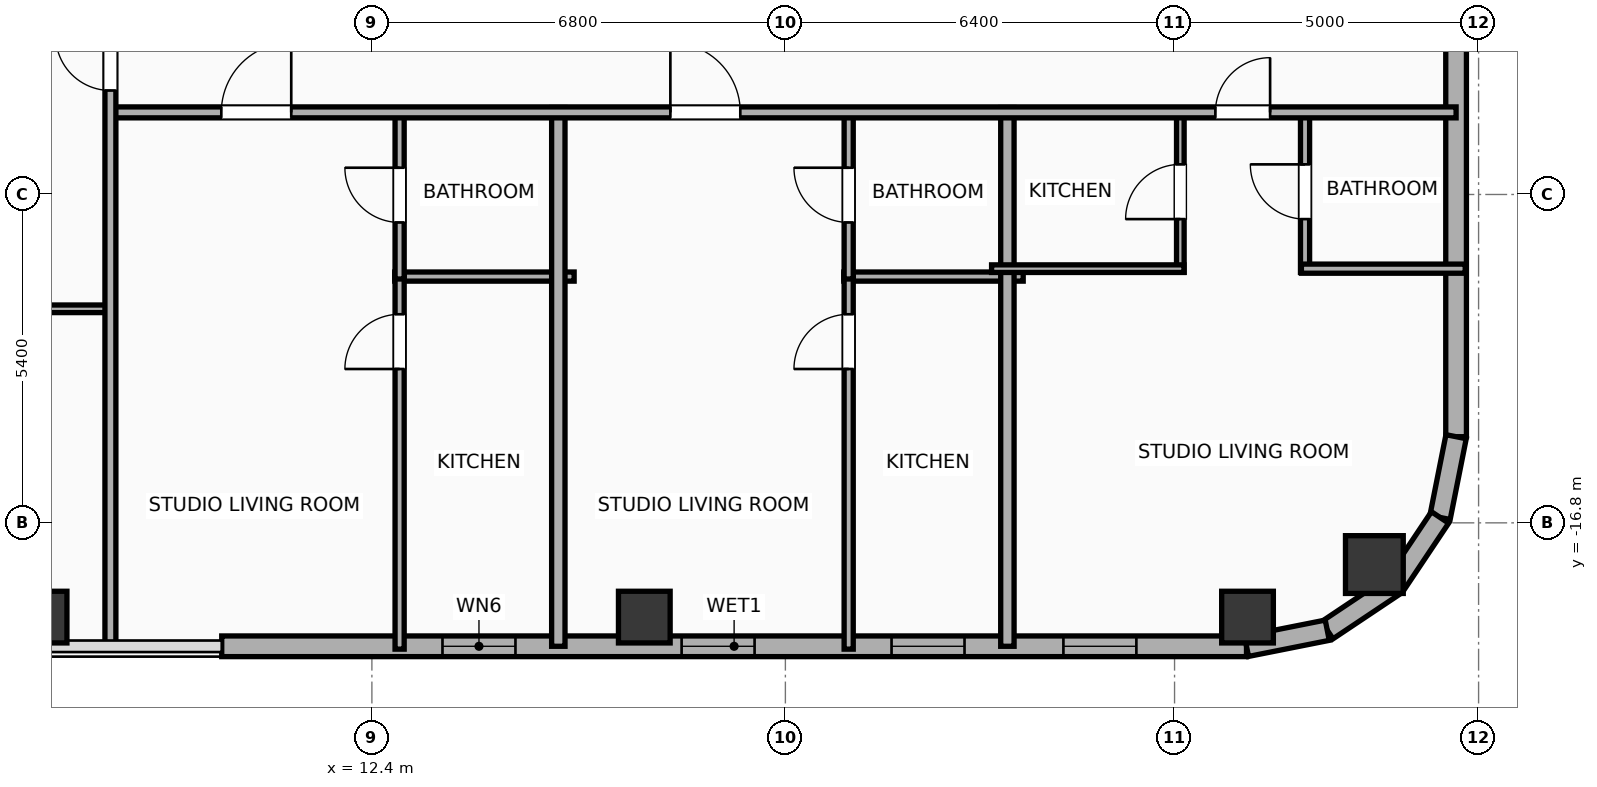
"""IFC4 building model, lengths in metres.
Left out: names, types, materials, properties, quantities, classifications, styles, units other than length and angle.
Written with IfcOpenShell. Run it as: python <this file> out.ifc"""

import sys

from ifc_helpers import new_model, si_unit, direction, frame, frame_2d, origin, origin_2d, place, context, subcontext, project, spatial, rectangle, hollow_rectangle, hollow_circle, extrude, element, fill, save


model = new_model("IFC4")
c1 = context("Model", 3, precision=1e-05, world=origin(), true_north=direction((0.0, 1.0)))
c2 = subcontext(c1, "Body", "Model", "MODEL_VIEW")
j1 = project(units=[si_unit("LENGTHUNIT", "METRE"), si_unit("PLANEANGLEUNIT", "RADIAN")], contexts=[c1])
p1 = place(None, origin())
s1 = spatial("IfcSite", under=j1, at=p1, CompositionType="ELEMENT")
p2 = place(p1, origin())
s2 = spatial("IfcBuilding", under=s1, at=p2, CompositionType="ELEMENT")
p3 = place(p2, frame((0.0, 0.0, 211.9)))
s3 = spatial("IfcBuildingStorey", under=s2, at=p3, CompositionType="ELEMENT", Elevation=211.9)
for number, where, z_axis, x_axis in (
    (1, (6.96, -18.35, 0.0), (0.0, 0.0, 1.0), (1.0, 0.0, 0.0)),
    (2, (16.88, -18.35, 0.0), (0.0, 0.0, 1.0), (1.0, 0.0, 0.0)),
    (3, (26.8, -18.35, 0.0), (0.0, 0.0, 1.0), (1.0, 0.0, 0.0)),
):
    element("IfcColumn", number, at=place(p3, frame(where, z_axis=z_axis, x_axis=x_axis)), inside=s3, PredefinedType="COLUMN", context=c2, shape_type="SweptSolid", body=[
        extrude(hollow_rectangle(XDim=0.85, YDim=0.85, WallThickness=0.028, at=origin_2d()), origin(), (0.0, 0.0, 1.0), 3.9),
    ])
p4 = place(p3, frame((28.886, -17.486, 0.0), z_axis=(0.0, 0.0, 1.0), x_axis=(1.0, 0.0, 0.0)))
e4 = element("IfcColumn", 4, at=p4, inside=s3, PredefinedType="COLUMN", context=c2, shape_type="SweptSolid", body=[
    extrude(hollow_circle(Radius=0.475, WallThickness=0.032, at=origin_2d()), origin(), (0.0, 0.0, 1.0), 3.9),
])
p5 = place(p3, frame((26.783, -18.83, 0.0), z_axis=(0.0, 0.0, 1.0), x_axis=(-1.0, 0.0, 0.0)))
e5 = element("IfcWall", 5, at=p5, inside=s3, PredefinedType="ELEMENTEDWALL", context=c2, shape_type="SweptSolid", body=[
    extrude(rectangle(XDim=16.853, YDim=0.34, at=frame_2d((8.426, 0.0))), origin(), (0.0, 0.0, 1.0), 3.65),
])
p6 = place(p5, frame((12.022, 0.0, 0.75)))
e6 = element("IfcOpeningElement", 6, at=p6, cuts=e5, PredefinedType="OPENING", context=c2, shape_type="SweptSolid", body=[
    extrude(rectangle(XDim=1.2, YDim=2.05, at=frame_2d((0.6, 1.025))), frame((0.0, 0.18, 0.0), z_axis=(0.0, -1.0, 0.0), x_axis=(1.0, 0.0, 0.0)), (0.0, 0.0, 1.0), 0.36),
])
p7 = place(p5, frame((8.09, 0.0, 0.75)))
e7 = element("IfcOpeningElement", 7, at=p7, cuts=e5, PredefinedType="OPENING", context=c2, shape_type="SweptSolid", body=[
    extrude(rectangle(XDim=1.2, YDim=2.05, at=frame_2d((0.6, 1.025))), frame((0.0, 0.18, 0.0), z_axis=(0.0, -1.0, 0.0), x_axis=(1.0, 0.0, 0.0)), (0.0, 0.0, 1.0), 0.36),
])
p8 = place(p5, frame((4.637, 0.0, 0.75)))
e8 = element("IfcOpeningElement", 8, at=p8, cuts=e5, PredefinedType="OPENING", context=c2, shape_type="SweptSolid", body=[
    extrude(rectangle(XDim=1.2, YDim=2.05, at=frame_2d((0.6, 1.025))), frame((0.0, 0.18, 0.0), z_axis=(0.0, -1.0, 0.0), x_axis=(1.0, 0.0, 0.0)), (0.0, 0.0, 1.0), 0.36),
])
p9 = place(p5, frame((1.811, 0.0, 0.75)))
e9 = element("IfcOpeningElement", 9, at=p9, cuts=e5, PredefinedType="OPENING", context=c2, shape_type="SweptSolid", body=[
    extrude(rectangle(XDim=1.2, YDim=2.05, at=frame_2d((0.6, 1.025))), frame((0.0, 0.18, 0.0), z_axis=(0.0, -1.0, 0.0), x_axis=(1.0, 0.0, 0.0)), (0.0, 0.0, 1.0), 0.36),
])
p10 = place(p3, frame((30.23, -4.515, 0.0), z_axis=(0.0, 0.0, 1.0), x_axis=(0.0, -1.0, 0.0)))
e10 = element("IfcWall", 10, at=p10, inside=s3, PredefinedType="ELEMENTEDWALL", context=c2, shape_type="SweptSolid", body=[
    extrude(rectangle(XDim=10.869, YDim=0.34, at=frame_2d((5.434, 0.0))), origin(), (0.0, 0.0, 1.0), 3.65),
])
p11 = place(p3, frame((30.23, -15.383, 0.0), z_axis=(0.0, 0.0, 1.0), x_axis=(-0.195110379894, -0.98078129043, 0.0)))
e11 = element("IfcWall", 11, at=p11, inside=s3, PredefinedType="ELEMENTEDWALL", context=c2, shape_type="SweptSolid", body=[
    extrude(rectangle(XDim=1.354, YDim=0.34, at=frame_2d((0.677, 0.0))), origin(), (0.0, 0.0, 1.0), 3.65),
])
p12 = place(p3, frame((29.966, -16.711, 0.0), z_axis=(0.0, 0.0, 1.0), x_axis=(-0.555584683399, -0.831459956686, 0.0)))
e12 = element("IfcWall", 12, at=p12, inside=s3, PredefinedType="ELEMENTEDWALL", context=c2, shape_type="SweptSolid", body=[
    extrude(rectangle(XDim=1.337, YDim=0.34, at=frame_2d((0.668, 0.0))), origin(), (0.0, 0.0, 1.0), 3.65),
])
p13 = place(p3, frame((29.223, -17.823, 0.0), z_axis=(0.0, 0.0, 1.0), x_axis=(-0.831403586725, -0.555669034571, 0.0)))
e13 = element("IfcWall", 13, at=p13, inside=s3, PredefinedType="ELEMENTEDWALL", context=c2, shape_type="SweptSolid", body=[
    extrude(rectangle(XDim=1.337, YDim=0.34, at=frame_2d((0.668, 0.0))), origin(), (0.0, 0.0, 1.0), 3.65),
])
p14 = place(p3, frame((28.111, -18.566, 0.0), z_axis=(0.0, 0.0, 1.0), x_axis=(-0.980788153188, -0.195075878998, 0.0)))
e14 = element("IfcWall", 14, at=p14, inside=s3, PredefinedType="ELEMENTEDWALL", context=c2, shape_type="SweptSolid", body=[
    extrude(rectangle(XDim=1.354, YDim=0.34, at=frame_2d((0.677, 0.0))), origin(), (0.0, 0.0, 1.0), 3.65),
])
p15 = place(p3, frame((12.776, -12.75, 0.0), z_axis=(0.0, 0.0, 1.0), x_axis=(1.0, 0.0, 0.0)))
e15 = element("IfcWall", 15, at=p15, inside=s3, PredefinedType="PLUMBINGWALL", context=c2, shape_type="SweptSolid", body=[
    extrude(rectangle(XDim=2.95, YDim=0.15, at=frame_2d((1.475, 0.0))), origin(), (0.0, 0.0, 1.0), 3.65),
])
p16 = place(p3, frame((12.856, -18.877, 0.0), z_axis=(0.0, 0.0, 1.0), x_axis=(0.0, 1.0, 0.0)))
e16 = element("IfcWall", 16, at=p16, inside=s3, PredefinedType="PLUMBINGWALL", context=c2, shape_type="SweptSolid", body=[
    extrude(rectangle(XDim=6.167, YDim=0.15, at=frame_2d((3.083, 0.0))), origin(), (0.0, 0.0, 1.0), 3.65),
])
p17 = place(p16, frame((4.607, 0.0, 0.0)))
e17 = element("IfcOpeningElement", 17, at=p17, cuts=e16, PredefinedType="OPENING", context=c2, shape_type="SweptSolid", body=[
    extrude(rectangle(XDim=0.9, YDim=2.05, at=frame_2d((0.45, 1.025))), frame((0.0, 0.085, 0.0), z_axis=(0.0, -1.0, 0.0), x_axis=(1.0, 0.0, 0.0)), (0.0, 0.0, 1.0), 0.17),
])
p18 = place(p3, frame((12.856, -12.79, 0.0), z_axis=(0.0, 0.0, 1.0), x_axis=(0.0, 1.0, 0.0)))
e18 = element("IfcWall", 18, at=p18, inside=s3, PredefinedType="PLUMBINGWALL", context=c2, shape_type="SweptSolid", body=[
    extrude(rectangle(XDim=2.76, YDim=0.15, at=frame_2d((1.38, 0.0))), origin(), (0.0, 0.0, 1.0), 3.65),
])
p19 = place(p18, frame((0.93, 0.0, 0.0)))
e19 = element("IfcOpeningElement", 19, at=p19, cuts=e18, PredefinedType="OPENING", context=c2, shape_type="SweptSolid", body=[
    extrude(rectangle(XDim=0.9, YDim=2.05, at=frame_2d((0.45, 1.025))), frame((0.0, 0.085, 0.0), z_axis=(0.0, -1.0, 0.0), x_axis=(1.0, 0.0, 0.0)), (0.0, 0.0, 1.0), 0.17),
])
p20 = place(p3, frame((15.466, -18.83, 0.0), z_axis=(0.0, 0.0, 1.0), x_axis=(0.0, 1.0, 0.0)))
e20 = element("IfcWall", 20, at=p20, inside=s3, PredefinedType="PARTITIONING", context=c2, shape_type="SweptSolid", body=[
    extrude(rectangle(XDim=8.86, YDim=0.22, at=frame_2d((4.43, 0.0))), origin(), (0.0, 0.0, 1.0), 3.65),
])
p21 = place(p3, frame((20.161, -12.75, 0.0), z_axis=(0.0, 0.0, 1.0), x_axis=(1.0, 0.0, 0.0)))
e21 = element("IfcWall", 21, at=p21, inside=s3, PredefinedType="PLUMBINGWALL", context=c2, shape_type="SweptSolid", body=[
    extrude(rectangle(XDim=2.95, YDim=0.15, at=frame_2d((1.475, 0.0))), origin(), (0.0, 0.0, 1.0), 3.65),
])
p22 = place(p3, frame((20.241, -18.877, 0.0), z_axis=(0.0, 0.0, 1.0), x_axis=(0.0, 1.0, 0.0)))
e22 = element("IfcWall", 22, at=p22, inside=s3, PredefinedType="PLUMBINGWALL", context=c2, shape_type="SweptSolid", body=[
    extrude(rectangle(XDim=6.167, YDim=0.15, at=frame_2d((3.083, 0.0))), origin(), (0.0, 0.0, 1.0), 3.65),
])
p23 = place(p22, frame((4.607, 0.0, 0.0)))
e23 = element("IfcOpeningElement", 23, at=p23, cuts=e22, PredefinedType="OPENING", context=c2, shape_type="SweptSolid", body=[
    extrude(rectangle(XDim=0.9, YDim=2.05, at=frame_2d((0.45, 1.025))), frame((0.0, 0.085, 0.0), z_axis=(0.0, -1.0, 0.0), x_axis=(1.0, 0.0, 0.0)), (0.0, 0.0, 1.0), 0.17),
])
p24 = place(p3, frame((20.241, -12.79, 0.0), z_axis=(0.0, 0.0, 1.0), x_axis=(0.0, 1.0, 0.0)))
e24 = element("IfcWall", 24, at=p24, inside=s3, PredefinedType="PLUMBINGWALL", context=c2, shape_type="SweptSolid", body=[
    extrude(rectangle(XDim=2.76, YDim=0.15, at=frame_2d((1.38, 0.0))), origin(), (0.0, 0.0, 1.0), 3.65),
])
p25 = place(p24, frame((0.93, 0.0, 0.0)))
e25 = element("IfcOpeningElement", 25, at=p25, cuts=e24, PredefinedType="OPENING", context=c2, shape_type="SweptSolid", body=[
    extrude(rectangle(XDim=0.9, YDim=2.05, at=frame_2d((0.45, 1.025))), frame((0.0, 0.085, 0.0), z_axis=(0.0, -1.0, 0.0), x_axis=(1.0, 0.0, 0.0)), (0.0, 0.0, 1.0), 0.17),
])
p26 = place(p3, frame((22.851, -18.83, 0.0), z_axis=(0.0, 0.0, 1.0), x_axis=(0.0, 1.0, 0.0)))
e26 = element("IfcWall", 26, at=p26, inside=s3, PredefinedType="PARTITIONING", context=c2, shape_type="SweptSolid", body=[
    extrude(rectangle(XDim=8.86, YDim=0.22, at=frame_2d((4.43, 0.0))), origin(), (0.0, 0.0, 1.0), 3.65),
])
p27 = place(p3, frame((25.695, -12.68, 0.0), z_axis=(0.0, 0.0, 1.0), x_axis=(0.0, 1.0, 0.0)))
e27 = element("IfcWall", 27, at=p27, inside=s3, PredefinedType="PARTITIONING", context=c2, shape_type="SweptSolid", body=[
    extrude(rectangle(XDim=2.65, YDim=0.125, at=frame_2d((1.325, 0.0))), origin(), (0.0, 0.0, 1.0), 3.65),
])
p28 = place(p27, frame((0.875, 0.0, 0.0)))
e28 = element("IfcOpeningElement", 28, at=p28, cuts=e27, PredefinedType="OPENING", context=c2, shape_type="SweptSolid", body=[
    extrude(rectangle(XDim=0.9, YDim=2.05, at=frame_2d((0.45, 1.025))), frame((0.0, 0.073, 0.0), z_axis=(0.0, -1.0, 0.0), x_axis=(1.0, 0.0, 0.0)), (0.0, 0.0, 1.0), 0.145),
])
p29 = place(p3, frame((27.746, -12.68, 0.0), z_axis=(0.0, 0.0, 1.0), x_axis=(0.0, 1.0, 0.0)))
e29 = element("IfcWall", 29, at=p29, inside=s3, PredefinedType="PLUMBINGWALL", context=c2, shape_type="SweptSolid", body=[
    extrude(rectangle(XDim=2.65, YDim=0.15, at=frame_2d((1.325, 0.0))), origin(), (0.0, 0.0, 1.0), 3.65),
])
p30 = place(p29, frame((0.875, 0.0, 0.0)))
e30 = element("IfcOpeningElement", 30, at=p30, cuts=e29, PredefinedType="OPENING", context=c2, shape_type="SweptSolid", body=[
    extrude(rectangle(XDim=0.9, YDim=2.05, at=frame_2d((0.45, 1.025))), frame((0.0, 0.085, 0.0), z_axis=(0.0, -1.0, 0.0), x_axis=(1.0, 0.0, 0.0)), (0.0, 0.0, 1.0), 0.17),
])
p31 = place(p3, frame((22.591, -12.62, 0.0), z_axis=(0.0, 0.0, 1.0), x_axis=(1.0, 0.0, 0.0)))
e31 = element("IfcWall", 31, at=p31, inside=s3, PredefinedType="PARTITIONING", context=c2, shape_type="SweptSolid", body=[
    extrude(rectangle(XDim=3.164, YDim=0.125, at=frame_2d((1.582, 0.0))), origin(), (0.0, 0.0, 1.0), 3.65),
])
p32 = place(p3, frame((27.686, -12.62, 0.0), z_axis=(0.0, 0.0, 1.0), x_axis=(1.0, 0.0, 0.0)))
e32 = element("IfcWall", 32, at=p32, inside=s3, PredefinedType="PLUMBINGWALL", context=c2, shape_type="SweptSolid", body=[
    extrude(rectangle(XDim=2.694, YDim=0.15, at=frame_2d((1.347, 0.0))), origin(), (0.0, 0.0, 1.0), 3.65),
])
p33 = place(p3, frame((8.08, -10.05, 0.0), z_axis=(0.0, 0.0, 1.0), x_axis=(1.0, 0.0, 0.0)))
e33 = element("IfcWall", 33, at=p33, inside=s3, PredefinedType="PARTITIONING", context=c2, shape_type="SweptSolid", body=[
    extrude(rectangle(XDim=22.15, YDim=0.18, at=frame_2d((11.075, 0.0))), origin(), (0.0, 0.0, 1.0), 3.65),
])
p34 = place(p33, frame((1.844, 0.0, 0.0)))
e34 = element("IfcOpeningElement", 34, at=p34, cuts=e33, PredefinedType="OPENING", context=c2, shape_type="SweptSolid", body=[
    extrude(rectangle(XDim=1.15, YDim=2.05, at=frame_2d((0.575, 1.025))), frame((0.0, 0.1, 0.0), z_axis=(0.0, -1.0, 0.0), x_axis=(1.0, 0.0, 0.0)), (0.0, 0.0, 1.0), 0.2),
])
p35 = place(p33, frame((9.229, 0.0, 0.0)))
e35 = element("IfcOpeningElement", 35, at=p35, cuts=e33, PredefinedType="OPENING", context=c2, shape_type="SweptSolid", body=[
    extrude(rectangle(XDim=1.15, YDim=2.05, at=frame_2d((0.575, 1.025))), frame((0.0, 0.1, 0.0), z_axis=(0.0, -1.0, 0.0), x_axis=(1.0, 0.0, 0.0)), (0.0, 0.0, 1.0), 0.2),
])
p36 = place(p33, frame((18.191, 0.0, 0.0)))
e36 = element("IfcOpeningElement", 36, at=p36, cuts=e33, PredefinedType="OPENING", context=c2, shape_type="SweptSolid", body=[
    extrude(rectangle(XDim=0.9, YDim=2.05, at=frame_2d((0.45, 1.025))), frame((0.0, 0.1, 0.0), z_axis=(0.0, -1.0, 0.0), x_axis=(1.0, 0.0, 0.0)), (0.0, 0.0, 1.0), 0.2),
])
p37 = place(p3, frame((0.02, -13.28, 0.0), z_axis=(0.0, 0.0, 1.0), x_axis=(1.0, 0.0, 0.0)))
e37 = element("IfcWall", 37, at=p37, inside=s3, PredefinedType="PARTITIONING", context=c2, shape_type="SweptSolid", body=[
    extrude(rectangle(XDim=8.06, YDim=0.125, at=frame_2d((4.03, 0.0))), origin(), (0.0, 0.0, 1.0), 3.65),
])
p38 = place(p37, frame((1.323, 0.0, 0.0)))
e38 = element("IfcOpeningElement", 38, at=p38, cuts=e37, PredefinedType="OPENING", context=c2, shape_type="SweptSolid", body=[
    extrude(rectangle(XDim=0.9, YDim=2.05, at=frame_2d((0.45, 1.025))), frame((0.0, 0.073, 0.0), z_axis=(0.0, -1.0, 0.0), x_axis=(1.0, 0.0, 0.0)), (0.0, 0.0, 1.0), 0.145),
])
p39 = place(p37, frame((5.837, 0.0, 0.0)))
e39 = element("IfcOpeningElement", 39, at=p39, cuts=e37, PredefinedType="OPENING", context=c2, shape_type="SweptSolid", body=[
    extrude(rectangle(XDim=0.9, YDim=2.05, at=frame_2d((0.45, 1.025))), frame((0.0, 0.073, 0.0), z_axis=(0.0, -1.0, 0.0), x_axis=(1.0, 0.0, 0.0)), (0.0, 0.0, 1.0), 0.145),
])
p40 = place(p3, frame((8.1, -18.83, 0.0), z_axis=(0.0, 0.0, 1.0), x_axis=(0.0, 1.0, 0.0)))
e40 = element("IfcWall", 40, at=p40, inside=s3, PredefinedType="PARTITIONING", context=c2, shape_type="SweptSolid", body=[
    extrude(rectangle(XDim=10.39, YDim=0.18, at=frame_2d((5.195, 0.0))), origin(), (0.0, 0.0, 1.0), 3.65),
])
p41 = place(p40, frame((9.14, 0.0, 0.0)))
e41 = element("IfcOpeningElement", 41, at=p41, cuts=e40, PredefinedType="OPENING", context=c2, shape_type="SweptSolid", body=[
    extrude(rectangle(XDim=0.9, YDim=2.05, at=frame_2d((0.45, 1.025))), frame((0.0, 0.1, 0.0), z_axis=(0.0, -1.0, 0.0), x_axis=(1.0, 0.0, 0.0)), (0.0, 0.0, 1.0), 0.2),
])
p42 = place(p6, origin())
e42 = element("IfcWindow", 42, at=p42, inside=s3, PartitioningType="SINGLE_PANEL", PredefinedType="WINDOW", context=c2, shape_type="SweptSolid", body=[
    extrude(rectangle(XDim=1.2, YDim=2.05, at=frame_2d((0.6, 1.025))), frame((0.0, 0.03, 0.0), z_axis=(0.0, -1.0, 0.0), x_axis=(1.0, 0.0, 0.0)), (0.0, 0.0, 1.0), 0.06),
])
fill(e6, e42)
p43 = place(p7, origin())
e43 = element("IfcWindow", 43, at=p43, inside=s3, PartitioningType="SINGLE_PANEL", PredefinedType="WINDOW", context=c2, shape_type="SweptSolid", body=[
    extrude(rectangle(XDim=1.2, YDim=2.05, at=frame_2d((0.6, 1.025))), frame((0.0, 0.03, 0.0), z_axis=(0.0, -1.0, 0.0), x_axis=(1.0, 0.0, 0.0)), (0.0, 0.0, 1.0), 0.06),
])
fill(e7, e43)
p44 = place(p8, origin())
e44 = element("IfcWindow", 44, at=p44, inside=s3, PartitioningType="SINGLE_PANEL", PredefinedType="WINDOW", context=c2, shape_type="SweptSolid", body=[
    extrude(rectangle(XDim=1.2, YDim=2.05, at=frame_2d((0.6, 1.025))), frame((0.0, 0.03, 0.0), z_axis=(0.0, -1.0, 0.0), x_axis=(1.0, 0.0, 0.0)), (0.0, 0.0, 1.0), 0.06),
])
fill(e8, e44)
p45 = place(p9, origin())
e45 = element("IfcWindow", 45, at=p45, inside=s3, PartitioningType="SINGLE_PANEL", PredefinedType="WINDOW", context=c2, shape_type="SweptSolid", body=[
    extrude(rectangle(XDim=1.2, YDim=2.05, at=frame_2d((0.6, 1.025))), frame((0.0, 0.03, 0.0), z_axis=(0.0, -1.0, 0.0), x_axis=(1.0, 0.0, 0.0)), (0.0, 0.0, 1.0), 0.06),
])
fill(e9, e45)
p46 = place(p17, origin())
e46 = element("IfcDoor", 46, at=p46, inside=s3, OperationType="SINGLE_SWING_LEFT", PredefinedType="DOOR", context=c2, shape_type="SweptSolid", body=[
    extrude(rectangle(XDim=0.9, YDim=2.05, at=frame_2d((0.45, 1.025))), frame((0.0, 0.025, 0.0), z_axis=(0.0, -1.0, 0.0), x_axis=(1.0, 0.0, 0.0)), (0.0, 0.0, 1.0), 0.05),
])
fill(e17, e46)
p47 = place(p19, origin())
e47 = element("IfcDoor", 47, at=p47, inside=s3, OperationType="SINGLE_SWING_RIGHT", PredefinedType="DOOR", context=c2, shape_type="SweptSolid", body=[
    extrude(rectangle(XDim=0.9, YDim=2.05, at=frame_2d((0.45, 1.025))), frame((0.0, 0.025, 0.0), z_axis=(0.0, -1.0, 0.0), x_axis=(1.0, 0.0, 0.0)), (0.0, 0.0, 1.0), 0.05),
])
fill(e19, e47)
p48 = place(p23, origin())
e48 = element("IfcDoor", 48, at=p48, inside=s3, OperationType="SINGLE_SWING_LEFT", PredefinedType="DOOR", context=c2, shape_type="SweptSolid", body=[
    extrude(rectangle(XDim=0.9, YDim=2.05, at=frame_2d((0.45, 1.025))), frame((0.0, 0.025, 0.0), z_axis=(0.0, -1.0, 0.0), x_axis=(1.0, 0.0, 0.0)), (0.0, 0.0, 1.0), 0.05),
])
fill(e23, e48)
p49 = place(p25, origin())
e49 = element("IfcDoor", 49, at=p49, inside=s3, OperationType="SINGLE_SWING_RIGHT", PredefinedType="DOOR", context=c2, shape_type="SweptSolid", body=[
    extrude(rectangle(XDim=0.9, YDim=2.05, at=frame_2d((0.45, 1.025))), frame((0.0, 0.025, 0.0), z_axis=(0.0, -1.0, 0.0), x_axis=(1.0, 0.0, 0.0)), (0.0, 0.0, 1.0), 0.05),
])
fill(e25, e49)
p50 = place(p28, origin())
e50 = element("IfcDoor", 50, at=p50, inside=s3, OperationType="SINGLE_SWING_LEFT", PredefinedType="DOOR", context=c2, shape_type="SweptSolid", body=[
    extrude(rectangle(XDim=0.9, YDim=2.05, at=frame_2d((0.45, 1.025))), frame((0.0, 0.025, 0.0), z_axis=(0.0, -1.0, 0.0), x_axis=(1.0, 0.0, 0.0)), (0.0, 0.0, 1.0), 0.05),
])
fill(e28, e50)
p51 = place(p30, origin())
e51 = element("IfcDoor", 51, at=p51, inside=s3, OperationType="SINGLE_SWING_RIGHT", PredefinedType="DOOR", context=c2, shape_type="SweptSolid", body=[
    extrude(rectangle(XDim=0.9, YDim=2.05, at=frame_2d((0.45, 1.025))), frame((0.0, 0.025, 0.0), z_axis=(0.0, -1.0, 0.0), x_axis=(1.0, 0.0, 0.0)), (0.0, 0.0, 1.0), 0.05),
])
fill(e30, e51)
p52 = place(p34, origin())
e52 = element("IfcDoor", 52, at=p52, inside=s3, OperationType="SINGLE_SWING_RIGHT", PredefinedType="DOOR", context=c2, shape_type="SweptSolid", body=[
    extrude(rectangle(XDim=1.15, YDim=2.05, at=frame_2d((0.575, 1.025))), frame((0.0, 0.025, 0.0), z_axis=(0.0, -1.0, 0.0), x_axis=(1.0, 0.0, 0.0)), (0.0, 0.0, 1.0), 0.05),
])
fill(e34, e52)
p53 = place(p35, origin())
e53 = element("IfcDoor", 53, at=p53, inside=s3, OperationType="SINGLE_SWING_LEFT", PredefinedType="DOOR", context=c2, shape_type="SweptSolid", body=[
    extrude(rectangle(XDim=1.15, YDim=2.05, at=frame_2d((0.575, 1.025))), frame((0.0, 0.025, 0.0), z_axis=(0.0, -1.0, 0.0), x_axis=(1.0, 0.0, 0.0)), (0.0, 0.0, 1.0), 0.05),
])
fill(e35, e53)
p54 = place(p36, origin())
e54 = element("IfcDoor", 54, at=p54, inside=s3, OperationType="SINGLE_SWING_RIGHT", PredefinedType="DOOR", context=c2, shape_type="SweptSolid", body=[
    extrude(rectangle(XDim=0.9, YDim=2.05, at=frame_2d((0.45, 1.025))), frame((0.0, 0.025, 0.0), z_axis=(0.0, -1.0, 0.0), x_axis=(1.0, 0.0, 0.0)), (0.0, 0.0, 1.0), 0.05),
])
fill(e36, e54)
p55 = place(p41, origin())
e55 = element("IfcDoor", 55, at=p55, inside=s3, OperationType="SINGLE_SWING_RIGHT", PredefinedType="DOOR", context=c2, shape_type="SweptSolid", body=[
    extrude(rectangle(XDim=0.9, YDim=2.05, at=frame_2d((0.45, 1.025))), frame((0.0, 0.025, 0.0), z_axis=(0.0, -1.0, 0.0), x_axis=(1.0, 0.0, 0.0)), (0.0, 0.0, 1.0), 0.05),
])
fill(e41, e55)
save(model, sys.argv[1])
